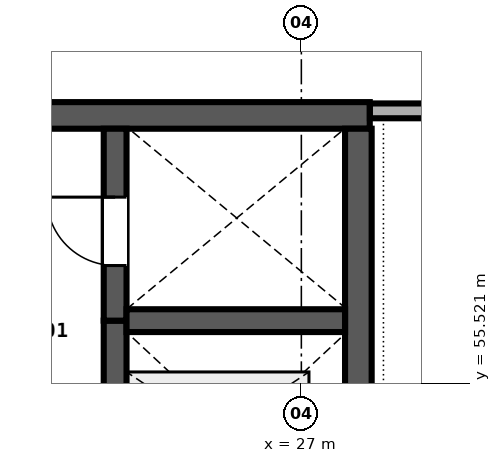
"""IFC4 building model, lengths in metres.
Left out: names, types, materials, properties, quantities, classifications, styles, units other than length and angle.
Written with IfcOpenShell. Run it as: python <this file> out.ifc"""

import sys

from ifc_helpers import new_model, si_unit, direction, frame, frame_2d, origin, place, context, subcontext, project, spatial, rectangle, extrude, element, fill, save


model = new_model("IFC4")
c1 = context("Model", 3, precision=1e-05, world=origin(), true_north=direction((0.0, 1.0)))
c2 = subcontext(c1, "Body", "Model", "MODEL_VIEW")
j1 = project(units=[si_unit("LENGTHUNIT", "METRE"), si_unit("PLANEANGLEUNIT", "RADIAN")], contexts=[c1])
p1 = place(None, origin())
s1 = spatial("IfcSite", under=j1, at=p1, CompositionType="ELEMENT")
p2 = place(p1, origin())
s2 = spatial("IfcBuilding", under=s1, at=p2, CompositionType="ELEMENT")
p3 = place(p2, frame((0.0, 0.0, 4.8)))
s3 = spatial("IfcBuildingStorey", under=s2, at=p3, CompositionType="ELEMENT", Elevation=4.8)
p4 = place(p3, frame((27.9, 59.05, 0.0), z_axis=(0.0, 0.0, 1.0), x_axis=(-1.0, 0.0, 0.0)))
e1 = element("IfcWall", 1, at=p4, inside=s3, PredefinedType="SHEAR", context=c2, shape_type="SweptSolid", body=[
    extrude(rectangle(XDim=18.0, YDim=0.35, at=frame_2d((9.0, 0.0))), origin(), (0.0, 0.0, 1.0), 4.52),
])
p5 = place(p4, frame((4.7, 0.0, 0.0)))
e2 = element("IfcOpeningElement", 2, at=p5, cuts=e1, PredefinedType="OPENING", context=c2, shape_type="SweptSolid", body=[
    extrude(rectangle(XDim=1.9, YDim=2.25, at=frame_2d((0.95, 1.125))), frame((0.0, 0.185, 0.0), z_axis=(0.0, -1.0, 0.0), x_axis=(1.0, 0.0, 0.0)), (0.0, 0.0, 1.0), 0.37),
])
p6 = place(p3, frame((27.75, 53.525, 0.0), z_axis=(0.0, 0.0, 1.0), x_axis=(0.0, 1.0, 0.0)))
e3 = element("IfcWall", 3, at=p6, inside=s3, PredefinedType="SHEAR", context=c2, shape_type="SweptSolid", body=[
    extrude(rectangle(XDim=5.35, YDim=0.35, at=frame_2d((2.675, 0.0))), origin(), (0.0, 0.0, 1.0), 4.52),
])
p7 = place(p3, frame((24.55, 53.525, 0.0), z_axis=(0.0, 0.0, 1.0), x_axis=(0.0, 1.0, 0.0)))
e4 = element("IfcWall", 4, at=p7, inside=s3, PredefinedType="SHEAR", context=c2, shape_type="SweptSolid", body=[
    extrude(rectangle(XDim=2.825, YDim=0.3, at=frame_2d((1.413, 0.0))), origin(), (0.0, 0.0, 1.0), 4.52),
])
p8 = place(p7, frame((0.775, 0.0, 0.0)))
e5 = element("IfcOpeningElement", 5, at=p8, cuts=e4, PredefinedType="OPENING", context=c2, shape_type="SweptSolid", body=[
    extrude(rectangle(XDim=1.1, YDim=2.1, at=frame_2d((0.55, 1.05))), frame((0.0, 0.16, 0.0), z_axis=(0.0, -1.0, 0.0), x_axis=(1.0, 0.0, 0.0)), (0.0, 0.0, 1.0), 0.32),
])
p9 = place(p3, frame((24.55, 56.35, 0.0), z_axis=(0.0, 0.0, 1.0), x_axis=(0.0, 1.0, 0.0)))
e6 = element("IfcWall", 6, at=p9, inside=s3, PredefinedType="SHEAR", context=c2, shape_type="SweptSolid", body=[
    extrude(rectangle(XDim=2.525, YDim=0.3, at=frame_2d((1.262, 0.0))), origin(), (0.0, 0.0, 1.0), 4.52),
])
p10 = place(p9, frame((0.725, 0.0, 0.0)))
e7 = element("IfcOpeningElement", 7, at=p10, cuts=e6, PredefinedType="OPENING", context=c2, shape_type="SweptSolid", body=[
    extrude(rectangle(XDim=0.9, YDim=2.1, at=frame_2d((0.45, 1.05))), frame((0.0, 0.16, 0.0), z_axis=(0.0, -1.0, 0.0), x_axis=(1.0, 0.0, 0.0)), (0.0, 0.0, 1.0), 0.32),
])
p11 = place(p3, frame((24.7, 56.35, 0.0), z_axis=(0.0, 0.0, 1.0), x_axis=(1.0, 0.0, 0.0)))
e8 = element("IfcWall", 8, at=p11, inside=s3, PredefinedType="SHEAR", context=c2, shape_type="SweptSolid", body=[
    extrude(rectangle(XDim=2.875, YDim=0.3, at=frame_2d((1.438, 0.0))), origin(), (0.0, 0.0, 1.0), 4.52),
])
p12 = place(p3, frame((27.902, 59.11, 0.0), z_axis=(0.0, 0.0, 1.0), x_axis=(1.0, 0.0, 0.0)))
e9 = element("IfcWall", 9, at=p12, inside=s3, PredefinedType="PARTITIONING", context=c2, shape_type="SweptSolid", body=[
    extrude(rectangle(XDim=2.038, YDim=0.195, at=frame_2d((1.019, 0.0))), origin(), (0.0, 0.0, 1.0), 3.28),
])
p13 = place(p10, origin())
e10 = element("IfcDoor", 10, at=p13, inside=s3, OperationType="SINGLE_SWING_RIGHT", PredefinedType="DOOR", context=c2, shape_type="SweptSolid", body=[
    extrude(rectangle(XDim=0.9, YDim=2.1, at=frame_2d((0.45, 1.05))), frame((0.0, 0.025, 0.0), z_axis=(0.0, -1.0, 0.0), x_axis=(1.0, 0.0, 0.0)), (0.0, 0.0, 1.0), 0.05),
])
fill(e7, e10)
save(model, sys.argv[1])
